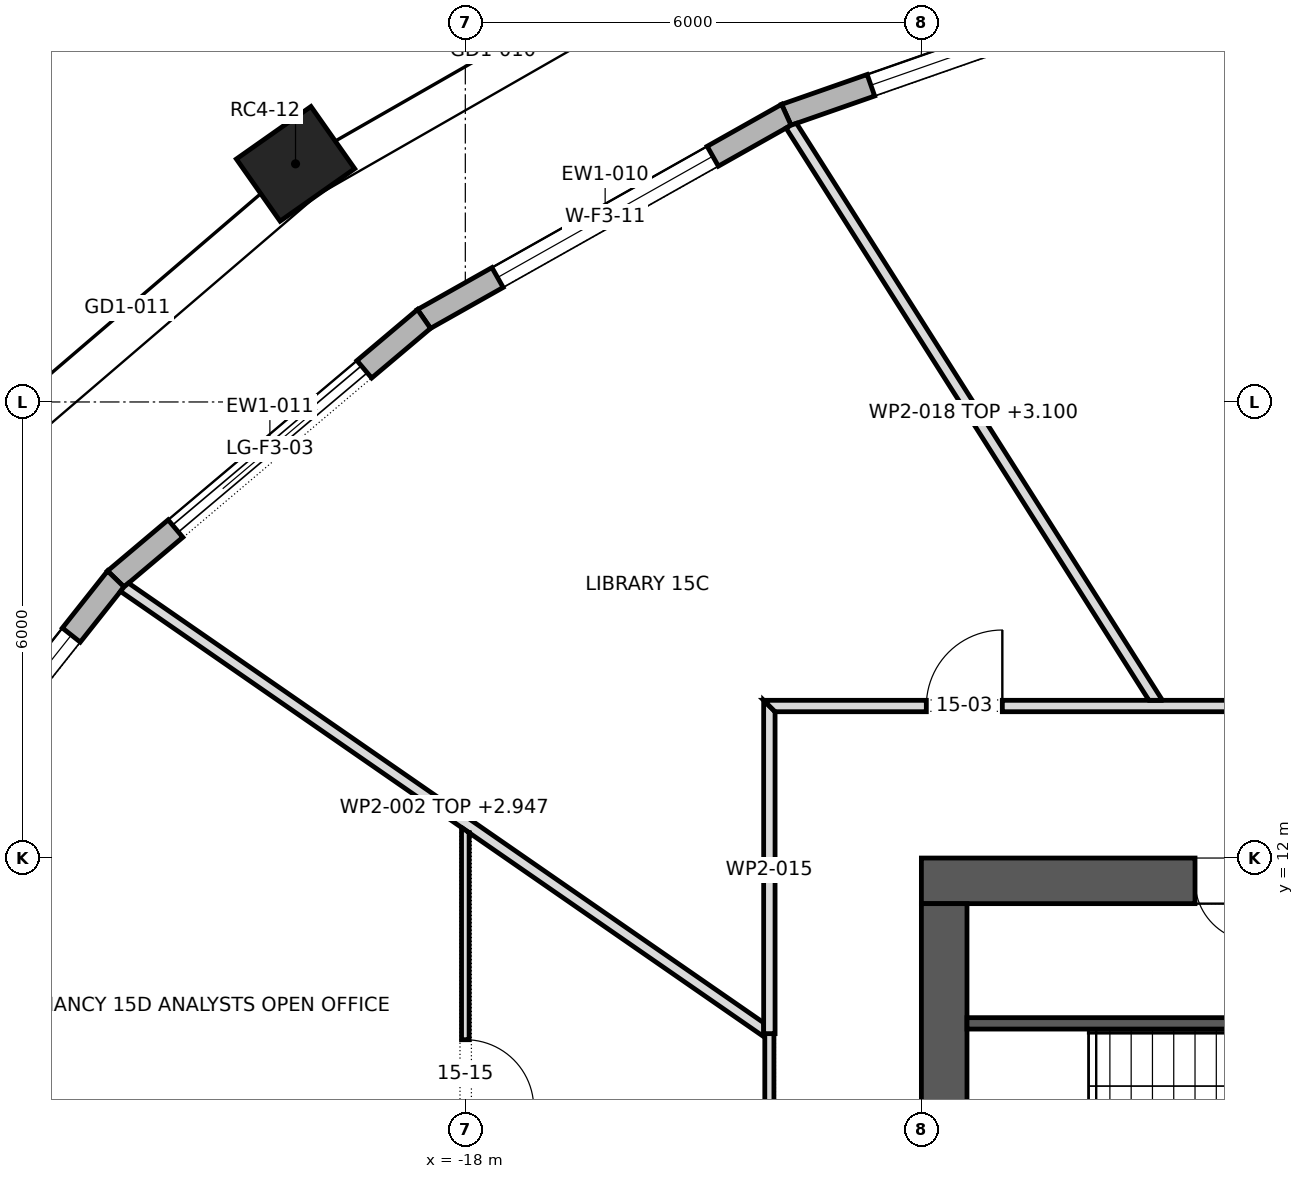
"""IFC4 building model, lengths in metres.
Left out: names, types, materials, properties, quantities, classifications, styles, units other than length and angle.
Written with IfcOpenShell. Run it as: python <this file> out.ifc"""

import sys

from ifc_helpers import new_model, si_unit, direction, frame, frame_2d, origin, origin_2d, place, context, subcontext, project, spatial, polyline, rectangle, outline, extrude, element, fill, save


model = new_model("IFC4")
c1 = context("Model", 3, precision=1e-05, world=origin(), true_north=direction((0.0, 1.0)))
c2 = subcontext(c1, "Body", "Model", "MODEL_VIEW")
j1 = project(units=[si_unit("LENGTHUNIT", "METRE"), si_unit("PLANEANGLEUNIT", "RADIAN")], contexts=[c1])
p1 = place(None, origin())
s1 = spatial("IfcSite", under=j1, at=p1, CompositionType="ELEMENT")
p2 = place(p1, origin())
s2 = spatial("IfcBuilding", under=s1, at=p2, CompositionType="ELEMENT")
p3 = place(p2, frame((0.0, 0.0, 214.9)))
s3 = spatial("IfcBuildingStorey", under=s2, at=p3, CompositionType="ELEMENT", Elevation=214.9)
p4 = place(p3, frame((-20.234, 21.133, 0.0), z_axis=(0.0, 0.0, 1.0), x_axis=(-0.817905775493, -0.575352189893, 0.0)))
e1 = element("IfcColumn", 1, at=p4, inside=s3, PredefinedType="COLUMN", context=c2, shape_type="SweptSolid", body=[
    extrude(rectangle(XDim=1.2, YDim=1.0, at=origin_2d()), origin(), (0.0, 0.0, 1.0), 4.0),
])
p5 = place(p3, frame((-12.0, 11.7, 0.0), z_axis=(0.0, 0.0, 1.0), x_axis=(1.0, 0.0, 0.0)))
e2 = element("IfcWall", 2, at=p5, inside=s3, PredefinedType="SHEAR", context=c2, shape_type="SweptSolid", body=[
    extrude(rectangle(XDim=24.0, YDim=0.6, at=frame_2d((12.0, 0.0))), origin(), (0.0, 0.0, 1.0), 4.0),
])
p6 = place(p5, frame((9.975, 0.0, 0.0)))
e3 = element("IfcOpeningElement", 3, at=p6, cuts=e2, PredefinedType="OPENING", context=c2, shape_type="SweptSolid", body=[
    extrude(rectangle(XDim=0.9, YDim=2.1, at=frame_2d((0.45, 1.05))), frame((0.0, 0.312, 0.0), z_axis=(0.0, -1.0, 0.0), x_axis=(1.0, 0.0, 0.0)), (0.0, 0.0, 1.0), 0.624),
])
p7 = place(p5, frame((3.6, 0.0, 0.0)))
e4 = element("IfcOpeningElement", 4, at=p7, cuts=e2, PredefinedType="OPENING", context=c2, shape_type="SweptSolid", body=[
    extrude(rectangle(XDim=0.8, YDim=2.1, at=frame_2d((0.4, 1.05))), frame((0.0, 0.312, 0.0), z_axis=(0.0, -1.0, 0.0), x_axis=(1.0, 0.0, 0.0)), (0.0, 0.0, 1.0), 0.624),
])
p8 = place(p5, frame((6.2, 0.0, 0.0)))
e5 = element("IfcOpeningElement", 5, at=p8, cuts=e2, PredefinedType="OPENING", context=c2, shape_type="SweptSolid", body=[
    extrude(rectangle(XDim=0.8, YDim=2.1, at=frame_2d((0.4, 1.05))), frame((0.0, 0.312, 0.0), z_axis=(0.0, -1.0, 0.0), x_axis=(1.0, 0.0, 0.0)), (0.0, 0.0, 1.0), 0.624),
])
p9 = place(p5, frame((15.85, 0.0, 0.0)))
e6 = element("IfcOpeningElement", 6, at=p9, cuts=e2, PredefinedType="OPENING", context=c2, shape_type="SweptSolid", body=[
    extrude(rectangle(XDim=0.8, YDim=2.1, at=frame_2d((0.4, 1.05))), frame((0.0, 0.312, 0.0), z_axis=(0.0, -1.0, 0.0), x_axis=(1.0, 0.0, 0.0)), (0.0, 0.0, 1.0), 0.624),
])
p10 = place(p3, frame((-11.7, -11.4, 0.0), z_axis=(0.0, 0.0, 1.0), x_axis=(0.0, 1.0, 0.0)))
e7 = element("IfcWall", 7, at=p10, inside=s3, PredefinedType="SHEAR", context=c2, shape_type="SweptSolid", body=[
    extrude(rectangle(XDim=22.8, YDim=0.6, at=frame_2d((11.4, 0.0))), origin(), (0.0, 0.0, 1.0), 4.0),
])
p11 = place(p10, frame((10.2, 0.0, 0.0)))
e8 = element("IfcOpeningElement", 8, at=p11, cuts=e7, PredefinedType="OPENING", context=c2, shape_type="SweptSolid", body=[
    extrude(rectangle(XDim=2.4, YDim=2.1, at=frame_2d((1.2, 1.05))), frame((0.0, 0.312, 0.0), z_axis=(0.0, -1.0, 0.0), x_axis=(1.0, 0.0, 0.0)), (0.0, 0.0, 1.0), 0.624),
])
p12 = place(p10, frame((18.925, 0.0, 0.0)))
e9 = element("IfcOpeningElement", 9, at=p12, cuts=e7, PredefinedType="OPENING", context=c2, shape_type="SweptSolid", body=[
    extrude(rectangle(XDim=1.2, YDim=2.1, at=frame_2d((0.6, 1.05))), frame((0.0, 0.312, 0.0), z_axis=(0.0, -1.0, 0.0), x_axis=(1.0, 0.0, 0.0)), (0.0, 0.0, 1.0), 0.624),
])
p13 = place(p10, frame((2.675, 0.0, 0.0)))
e10 = element("IfcOpeningElement", 10, at=p13, cuts=e7, PredefinedType="OPENING", context=c2, shape_type="SweptSolid", body=[
    extrude(rectangle(XDim=1.2, YDim=2.1, at=frame_2d((0.6, 1.05))), frame((0.0, 0.312, 0.0), z_axis=(0.0, -1.0, 0.0), x_axis=(1.0, 0.0, 0.0)), (0.0, 0.0, 1.0), 0.624),
])
p14 = place(p3, frame((-8.483, 23.627, 0.0), z_axis=(0.0, 0.0, 1.0), x_axis=(-0.944053670735, -0.329791853708, 0.0)))
e11 = element("IfcWall", 11, at=p14, inside=s3, PredefinedType="STANDARD", context=c2, shape_type="SweptSolid", body=[
    extrude(outline(polyline([(-0.013, -0.15), (5.621, -0.15), (5.594, 0.15), (0.013, 0.15), (-0.013, -0.15)])), origin(), (0.0, 0.0, 1.0), 3.7),
])
p15 = place(p14, frame((1.179, 0.0, 0.6)))
e12 = element("IfcOpeningElement", 12, at=p15, cuts=e11, PredefinedType="OPENING", context=c2, shape_type="SweptSolid", body=[
    extrude(rectangle(XDim=3.25, YDim=2.65, at=frame_2d((1.625, 1.325))), frame((0.0, 0.162, 0.0), z_axis=(0.0, -1.0, 0.0), x_axis=(1.0, 0.0, 0.0)), (0.0, 0.0, 1.0), 0.324),
])
p16 = place(p3, frame((-13.777, 21.778, 0.0), z_axis=(0.0, 0.0, 1.0), x_axis=(-0.871207038577, -0.490915772749, 0.0)))
e13 = element("IfcWall", 13, at=p16, inside=s3, PredefinedType="STANDARD", context=c2, shape_type="SweptSolid", body=[
    extrude(outline(polyline([(-0.013, -0.15), (5.485, -0.15), (5.457, 0.15), (0.013, 0.15), (-0.013, -0.15)])), origin(), (0.0, 0.0, 1.0), 3.7),
])
p17 = place(p16, frame((1.111, 0.0, 0.6)))
e14 = element("IfcOpeningElement", 14, at=p17, cuts=e13, PredefinedType="OPENING", context=c2, shape_type="SweptSolid", body=[
    extrude(rectangle(XDim=3.25, YDim=2.65, at=frame_2d((1.625, 1.325))), frame((0.0, 0.162, 0.0), z_axis=(0.0, -1.0, 0.0), x_axis=(1.0, 0.0, 0.0)), (0.0, 0.0, 1.0), 0.324),
])
p18 = place(p3, frame((-18.543, 19.092, 0.0), z_axis=(0.0, 0.0, 1.0), x_axis=(-0.764397795062, -0.644744919255, 0.0)))
e15 = element("IfcWall", 15, at=p18, inside=s3, PredefinedType="STANDARD", context=c2, shape_type="SweptSolid", body=[
    extrude(outline(polyline([(-0.014, -0.15), (5.32, -0.15), (5.29, 0.15), (0.014, 0.15), (-0.014, -0.15)])), origin(), (0.0, 0.0, 1.0), 3.7),
])
p19 = place(p18, frame((1.028, 0.0, 0.0)))
e16 = element("IfcOpeningElement", 16, at=p19, cuts=e15, PredefinedType="OPENING", context=c2, shape_type="SweptSolid", body=[
    extrude(rectangle(XDim=3.25, YDim=3.25, at=frame_2d((1.625, 1.625))), frame((0.0, 0.162, 0.0), z_axis=(0.0, -1.0, 0.0), x_axis=(1.0, 0.0, 0.0)), (0.0, 0.0, 1.0), 0.324),
])
p20 = place(p3, frame((-22.599, 15.672, 0.0), z_axis=(0.0, 0.0, 1.0), x_axis=(-0.621017151557, -0.783796974651, 0.0)))
e17 = element("IfcWall", 17, at=p20, inside=s3, PredefinedType="STANDARD", context=c2, shape_type="SweptSolid", body=[
    extrude(outline(polyline([(-0.015, -0.15), (5.15, -0.15), (5.118, 0.15), (0.015, 0.15), (-0.015, -0.15)])), origin(), (0.0, 0.0, 1.0), 3.7),
])
p21 = place(p20, frame((0.942, 0.0, 0.6)))
e18 = element("IfcOpeningElement", 18, at=p21, cuts=e17, PredefinedType="OPENING", context=c2, shape_type="SweptSolid", body=[
    extrude(rectangle(XDim=3.25, YDim=2.65, at=frame_2d((1.625, 1.325))), frame((0.0, 0.162, 0.0), z_axis=(0.0, -1.0, 0.0), x_axis=(1.0, 0.0, 0.0)), (0.0, 0.0, 1.0), 0.324),
])
p22 = place(p3, frame((-11.4, 9.825, 0.0), z_axis=(0.0, 0.0, 1.0), x_axis=(1.0, 0.0, 0.0)))
e19 = element("IfcWall", 19, at=p22, inside=s3, PredefinedType="SHEAR", context=c2, shape_type="SweptSolid", body=[
    extrude(rectangle(XDim=8.0, YDim=0.15, at=frame_2d((4.0, 0.0))), origin(), (0.0, 0.0, 1.0), 3.7),
])
p23 = place(p3, frame((-22.494, 15.57, 0.0), z_axis=(0.0, 0.0, 1.0), x_axis=(0.822227997751, -0.569158255421, 0.0)))
e20 = element("IfcWall", 20, at=p23, inside=s3, PredefinedType="PARTITIONING", context=c2, shape_type="SweptSolid", body=[
    extrude(outline(polyline([(0.0, -0.075), (1.858, -0.075), (3.717, -0.075), (5.575, -0.075), (5.577, -0.073), (5.578, -0.075), (7.155, -0.075), (8.732, -0.075), (10.309, -0.075), (10.309, -0.075), (10.281, -0.034), (10.269, -0.043), (10.24, -0.002), (10.24, -0.002), (10.187, 0.075), (8.493, 0.075), (6.8, 0.075), (5.106, 0.075), (3.412, 0.075), (1.719, 0.075), (0.025, 0.075), (0.004, -0.0), (0.0, -0.066), (0.0, -0.075)])), origin(), (0.0, 0.0, 1.0), 2.947),
])
p24 = place(p3, frame((-18.0, -1.418, 0.0), z_axis=(0.0, 0.0, 1.0), x_axis=(0.0, 1.0, 0.0)))
e21 = element("IfcWall", 21, at=p24, inside=s3, PredefinedType="PARTITIONING", context=c2, shape_type="SweptSolid", body=[
    extrude(outline(polyline([(0.008, -0.05), (1.813, -0.05), (3.618, -0.05), (5.423, -0.05), (7.229, -0.05), (7.229, -0.05), (7.328, -0.05), (7.328, -0.05), (8.934, -0.05), (10.54, -0.05), (12.146, -0.05), (13.751, -0.05), (13.821, 0.05), (13.821, 0.05), (11.889, 0.05), (9.957, 0.05), (8.025, 0.05), (6.093, 0.05), (6.092, 0.048), (6.085, 0.05), (4.564, 0.05), (3.042, 0.05), (1.521, 0.05), (0.0, 0.05), (0.0, 0.045), (0.008, -0.05)])), origin(), (0.0, 0.0, 1.0), 3.7),
])
p25 = place(p24, frame((10.128, 0.0, 0.0)))
e22 = element("IfcOpeningElement", 22, at=p25, cuts=e21, PredefinedType="OPENING", context=c2, shape_type="SweptSolid", body=[
    extrude(rectangle(XDim=0.9, YDim=2.1, at=frame_2d((0.45, 1.05))), frame((0.0, 0.062, 0.0), z_axis=(0.0, -1.0, 0.0), x_axis=(1.0, 0.0, 0.0)), (0.0, 0.0, 1.0), 0.124),
])
p26 = place(p3, frame((-14.0, 5.86, 0.0), z_axis=(0.0, 0.0, 1.0), x_axis=(0.0, 1.0, 0.0)))
e23 = element("IfcWall", 23, at=p26, inside=s3, PredefinedType="PARTITIONING", context=c2, shape_type="SweptSolid", body=[
    extrude(rectangle(XDim=3.83, YDim=0.12, at=frame_2d((1.915, 0.0))), origin(), (0.0, 0.0, 1.0), 3.7),
])
p27 = place(p26, frame((1.415, 0.0, 0.0)))
e24 = element("IfcOpeningElement", 24, at=p27, cuts=e23, PredefinedType="OPENING", context=c2, shape_type="SweptSolid", body=[
    extrude(rectangle(XDim=1.0, YDim=2.1, at=frame_2d((0.5, 1.05))), frame((0.0, 0.072, 0.0), z_axis=(0.0, -1.0, 0.0), x_axis=(1.0, 0.0, 0.0)), (0.0, 0.0, 1.0), 0.144),
])
p28 = place(p3, frame((-14.0, 9.69, 0.0), z_axis=(0.0, 0.0, 1.0), x_axis=(0.0, 1.0, 0.0)))
e25 = element("IfcWall", 25, at=p28, inside=s3, PredefinedType="PARTITIONING", context=c2, shape_type="SweptSolid", body=[
    extrude(outline(polyline([(0.0, -0.075), (1.412, -0.075), (2.823, -0.075), (4.235, -0.075), (4.385, 0.075), (2.923, 0.075), (1.462, 0.075), (0.0, 0.075), (0.0, -0.075)])), origin(), (0.0, 0.0, 1.0), 3.7),
])
p29 = place(p3, frame((-14.075, 14.0, 0.0), z_axis=(0.0, 0.0, 1.0), x_axis=(1.0, 0.0, 0.0)))
e26 = element("IfcWall", 26, at=p29, inside=s3, PredefinedType="PARTITIONING", context=c2, shape_type="SweptSolid", body=[
    extrude(outline(polyline([(15.705, 0.075), (13.742, 0.075), (11.779, 0.075), (9.815, 0.075), (7.853, 0.075), (5.889, 0.075), (3.926, 0.075), (1.963, 0.075), (0.0, 0.075), (0.15, -0.075), (2.094, -0.075), (4.039, -0.075), (5.983, -0.075), (7.927, -0.075), (9.872, -0.075), (11.816, -0.075), (13.76, -0.075), (15.705, -0.075), (15.705, 0.075)])), origin(), (0.0, 0.0, 1.0), 3.7),
])
p30 = place(p29, frame((9.955, 0.0, 0.0)))
e27 = element("IfcOpeningElement", 27, at=p30, cuts=e26, PredefinedType="OPENING", context=c2, shape_type="SweptSolid", body=[
    extrude(rectangle(XDim=1.0, YDim=2.1, at=frame_2d((0.5, 1.05))), frame((0.0, 0.087, 0.0), z_axis=(0.0, -1.0, 0.0), x_axis=(1.0, 0.0, 0.0)), (0.0, 0.0, 1.0), 0.174),
])
p31 = place(p29, frame((2.14, 0.0, 0.0)))
e28 = element("IfcOpeningElement", 28, at=p31, cuts=e26, PredefinedType="OPENING", context=c2, shape_type="SweptSolid", body=[
    extrude(rectangle(XDim=1.0, YDim=2.1, at=frame_2d((0.5, 1.05))), frame((0.0, 0.087, 0.0), z_axis=(0.0, -1.0, 0.0), x_axis=(1.0, 0.0, 0.0)), (0.0, 0.0, 1.0), 0.174),
])
p32 = place(p3, frame((-8.892, 14.035, 0.0), z_axis=(0.0, 0.0, 1.0), x_axis=(-0.535558051622, 0.84449841524, 0.0)))
e29 = element("IfcWall", 29, at=p32, inside=s3, PredefinedType="PARTITIONING", context=c2, shape_type="SweptSolid", body=[
    extrude(outline(polyline([(0.0, -0.075), (1.798, -0.075), (3.595, -0.075), (5.393, -0.075), (7.191, -0.075), (8.989, -0.075), (9.006, -0.0), (9.01, 0.069), (9.01, 0.075), (7.227, 0.075), (5.444, 0.075), (3.661, 0.075), (1.878, 0.075), (0.095, 0.075), (0.0, -0.075), (0.0, -0.075)])), origin(), (0.0, 0.0, 1.0), 3.1),
])
p33 = place(p15, origin())
e30 = element("IfcWindow", 30, at=p33, inside=s3, PartitioningType="TRIPLE_PANEL_VERTICAL", PredefinedType="WINDOW", context=c2, shape_type="SweptSolid", body=[
    extrude(rectangle(XDim=3.25, YDim=2.65, at=frame_2d((1.625, 1.325))), frame((0.0, 0.03, 0.0), z_axis=(0.0, -1.0, 0.0), x_axis=(1.0, 0.0, 0.0)), (0.0, 0.0, 1.0), 0.06),
])
fill(e12, e30)
p34 = place(p17, origin())
e31 = element("IfcWindow", 31, at=p34, inside=s3, PartitioningType="TRIPLE_PANEL_VERTICAL", PredefinedType="WINDOW", context=c2, shape_type="SweptSolid", body=[
    extrude(rectangle(XDim=3.25, YDim=2.65, at=frame_2d((1.625, 1.325))), frame((0.0, 0.03, 0.0), z_axis=(0.0, -1.0, 0.0), x_axis=(1.0, 0.0, 0.0)), (0.0, 0.0, 1.0), 0.06),
])
fill(e14, e31)
p35 = place(p19, origin())
e32 = element("IfcDoor", 32, at=p35, inside=s3, OperationType="DOUBLE_DOOR_SLIDING", PredefinedType="DOOR", context=c2, shape_type="SweptSolid", body=[
    extrude(rectangle(XDim=3.25, YDim=3.25, at=frame_2d((1.625, 1.625))), frame((0.0, 0.025, 0.0), z_axis=(0.0, -1.0, 0.0), x_axis=(1.0, 0.0, 0.0)), (0.0, 0.0, 1.0), 0.05),
])
fill(e16, e32)
p36 = place(p21, origin())
e33 = element("IfcWindow", 33, at=p36, inside=s3, PartitioningType="TRIPLE_PANEL_VERTICAL", PredefinedType="WINDOW", context=c2, shape_type="SweptSolid", body=[
    extrude(rectangle(XDim=3.25, YDim=2.65, at=frame_2d((1.625, 1.325))), frame((0.0, 0.03, 0.0), z_axis=(0.0, -1.0, 0.0), x_axis=(1.0, 0.0, 0.0)), (0.0, 0.0, 1.0), 0.06),
])
fill(e18, e33)
p37 = place(p7, frame((0.8, 0.0, 0.0), z_axis=(0.0, 0.0, 1.0), x_axis=(-1.0, 0.0, 0.0)))
e34 = element("IfcDoor", 34, at=p37, inside=s3, OperationType="SINGLE_SWING_RIGHT", PredefinedType="DOOR", context=c2, shape_type="SweptSolid", body=[
    extrude(rectangle(XDim=0.8, YDim=2.1, at=frame_2d((0.4, 1.05))), frame((0.0, 0.025, 0.0), z_axis=(0.0, -1.0, 0.0), x_axis=(1.0, 0.0, 0.0)), (0.0, 0.0, 1.0), 0.05),
])
fill(e4, e34)
p38 = place(p31, origin())
e35 = element("IfcDoor", 35, at=p38, inside=s3, OperationType="SINGLE_SWING_LEFT", PredefinedType="DOOR", context=c2, shape_type="SweptSolid", body=[
    extrude(rectangle(XDim=1.0, YDim=2.1, at=frame_2d((0.5, 1.05))), frame((0.0, 0.025, 0.0), z_axis=(0.0, -1.0, 0.0), x_axis=(1.0, 0.0, 0.0)), (0.0, 0.0, 1.0), 0.05),
])
fill(e28, e35)
p39 = place(p25, frame((0.9, 0.0, 0.0), z_axis=(0.0, 0.0, 1.0), x_axis=(-1.0, 0.0, 0.0)))
e36 = element("IfcDoor", 36, at=p39, inside=s3, OperationType="SINGLE_SWING_LEFT", PredefinedType="DOOR", context=c2, shape_type="SweptSolid", body=[
    extrude(rectangle(XDim=0.9, YDim=2.1, at=frame_2d((0.45, 1.05))), frame((0.0, 0.025, 0.0), z_axis=(0.0, -1.0, 0.0), x_axis=(1.0, 0.0, 0.0)), (0.0, 0.0, 1.0), 0.05),
])
fill(e22, e36)
save(model, sys.argv[1])
